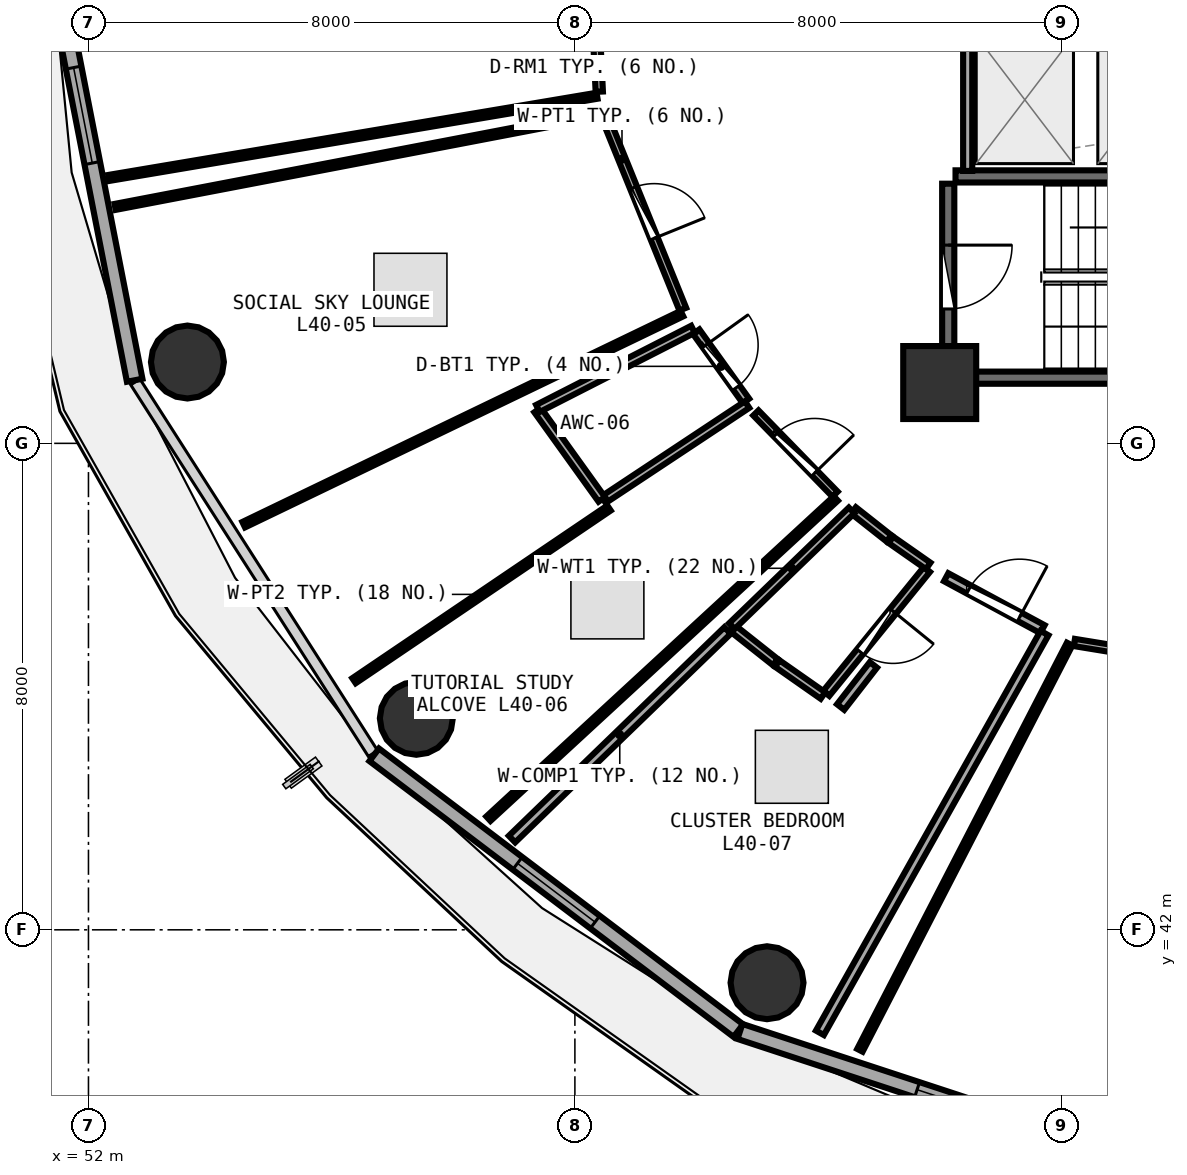
"""IFC4 building model, lengths in metres.
Left out: names, types, materials, properties, quantities, classifications, styles, units other than length and angle.
Written with IfcOpenShell. Run it as: python <this file> out.ifc"""

import sys

from ifc_helpers import new_model, si_unit, direction, frame, frame_2d, origin, origin_2d, place, context, subcontext, project, spatial, rectangle, circle, extrude, element, fill, save


model = new_model("IFC4")
c1 = context("Model", 3, precision=1e-05, world=origin(), true_north=direction((0.0, 1.0)))
c2 = subcontext(c1, "Body", "Model", "MODEL_VIEW")
j1 = project(units=[si_unit("LENGTHUNIT", "METRE"), si_unit("PLANEANGLEUNIT", "RADIAN")], contexts=[c1])
p1 = place(None, origin())
s1 = spatial("IfcSite", under=j1, at=p1, CompositionType="ELEMENT")
p2 = place(p1, origin())
s2 = spatial("IfcBuilding", under=s1, at=p2, CompositionType="ELEMENT")
p3 = place(p2, frame((0.0, 0.0, 158.1)))
s3 = spatial("IfcBuildingStorey", under=s2, at=p3, CompositionType="ELEMENT", Elevation=158.1)
p4 = place(p3, frame((66.0, 51.0, 0.0), z_axis=(0.0, 0.0, 1.0), x_axis=(1.0, 0.0, 0.0)))
e1 = element("IfcColumn", 1, at=p4, inside=s3, PredefinedType="PILASTER", context=c2, shape_type="SweptSolid", body=[
    extrude(rectangle(XDim=1.2, YDim=1.2, at=origin_2d()), origin(), (0.0, 0.0, 1.0), 3.75),
])
for number, where, z_axis, x_axis in (
    (2, (53.627, 51.337, 0.0), (0.0, 0.0, 1.0), (1.0, 0.0, 0.0)),
    (3, (57.392, 45.479, 0.0), (0.0, 0.0, 1.0), (1.0, 0.0, 0.0)),
    (4, (63.16, 41.13, 0.0), (0.0, 0.0, 1.0), (1.0, 0.0, 0.0)),
):
    element("IfcColumn", number, at=place(p3, frame(where, z_axis=z_axis, x_axis=x_axis)), inside=s3, PredefinedType="COLUMN", context=c2, shape_type="SweptSolid", body=[
        extrude(circle(Radius=0.6, at=origin_2d()), origin(), (0.0, 0.0, 1.0), 3.75),
    ])
p5 = place(p3, frame((51.403, 57.985, 0.0), z_axis=(0.0, 0.0, 1.0), x_axis=(0.191716984769, -0.981450252306, 0.0)))
e5 = element("IfcWall", 5, at=p5, inside=s3, PredefinedType="SOLIDWALL", context=c2, shape_type="SweptSolid", body=[
    extrude(rectangle(XDim=7.079, YDim=0.26, at=frame_2d((3.54, 0.0))), origin(), (0.0, 0.0, 1.0), 3.475),
])
p6 = place(p5, frame((1.84, 0.0, 0.85)))
e6 = element("IfcOpeningElement", 6, at=p6, cuts=e5, PredefinedType="OPENING", context=c2, shape_type="SweptSolid", body=[
    extrude(rectangle(XDim=1.6, YDim=1.45, at=frame_2d((0.8, 0.725))), frame((0.0, 0.14, 0.0), z_axis=(0.0, -1.0, 0.0), x_axis=(1.0, 0.0, 0.0)), (0.0, 0.0, 1.0), 0.28),
])
p7 = place(p3, frame((56.699, 44.878, 0.0), z_axis=(0.0, 0.0, 1.0), x_axis=(0.797163719609, -0.603763202042, 0.0)))
e7 = element("IfcWall", 7, at=p7, inside=s3, PredefinedType="SOLIDWALL", context=c2, shape_type="SweptSolid", body=[
    extrude(rectangle(XDim=7.512, YDim=0.26, at=frame_2d((3.756, 0.0))), origin(), (0.0, 0.0, 1.0), 3.475),
])
p8 = place(p7, frame((2.956, 0.0, 0.85)))
e8 = element("IfcOpeningElement", 8, at=p8, cuts=e7, PredefinedType="OPENING", context=c2, shape_type="SweptSolid", body=[
    extrude(rectangle(XDim=1.6, YDim=1.45, at=frame_2d((0.8, 0.725))), frame((0.0, 0.14, 0.0), z_axis=(0.0, -1.0, 0.0), x_axis=(1.0, 0.0, 0.0)), (0.0, 0.0, 1.0), 0.28),
])
p9 = place(p3, frame((62.714, 40.328, 0.0), z_axis=(0.0, 0.0, 1.0), x_axis=(0.950038302428, -0.312133343173, 0.0)))
e9 = element("IfcWall", 9, at=p9, inside=s3, PredefinedType="SOLIDWALL", context=c2, shape_type="SweptSolid", body=[
    extrude(rectangle(XDim=7.733, YDim=0.26, at=frame_2d((3.867, 0.0))), origin(), (0.0, 0.0, 1.0), 3.475),
])
p10 = place(p9, frame((3.067, 0.0, 0.85)))
e10 = element("IfcOpeningElement", 10, at=p10, cuts=e9, PredefinedType="OPENING", context=c2, shape_type="SweptSolid", body=[
    extrude(rectangle(XDim=1.6, YDim=1.45, at=frame_2d((0.8, 0.725))), frame((0.0, 0.14, 0.0), z_axis=(0.0, -1.0, 0.0), x_axis=(1.0, 0.0, 0.0)), (0.0, 0.0, 1.0), 0.28),
])
for number, where, z_axis, x_axis in (
    (11, (66.26, 51.08, 0.0), (0.0, 0.0, 1.0), (1.0, 0.0, 0.0)),
    (12, (73.42, 54.39, 0.0), (0.0, 0.0, 1.0), (-1.0, 0.0, 0.0)),
):
    element("IfcWall", number, at=place(p3, frame(where, z_axis=z_axis, x_axis=x_axis)), inside=s3, PredefinedType="SHEAR", context=c2, shape_type="SweptSolid", body=[
        extrude(rectangle(XDim=7.16, YDim=0.2, at=frame_2d((3.58, 0.0))), origin(), (0.0, 0.0, 1.0), 3.49),
    ])
p11 = place(p3, frame((66.14, 54.27, 0.0), z_axis=(0.0, 0.0, 1.0), x_axis=(0.0, -1.0, 0.0)))
e13 = element("IfcWall", 13, at=p11, inside=s3, PredefinedType="SHEAR", context=c2, shape_type="SweptSolid", body=[
    extrude(rectangle(XDim=3.07, YDim=0.2, at=frame_2d((1.535, 0.0))), origin(), (0.0, 0.0, 1.0), 3.49),
])
p12 = place(p11, frame((1.01, 0.0, 0.0)))
e14 = element("IfcOpeningElement", 14, at=p12, cuts=e13, PredefinedType="OPENING", context=c2, shape_type="SweptSolid", body=[
    extrude(rectangle(XDim=1.05, YDim=2.1, at=frame_2d((0.525, 1.05))), frame((0.0, 0.11, 0.0), z_axis=(0.0, -1.0, 0.0), x_axis=(1.0, 0.0, 0.0)), (0.0, 0.0, 1.0), 0.22),
])
p13 = place(p3, frame((66.46, 54.48, 0.0), z_axis=(0.0, 0.0, 1.0), x_axis=(0.0, 1.0, 0.0)))
e15 = element("IfcWall", 15, at=p13, inside=s3, PredefinedType="PARTITIONING", context=c2, shape_type="SweptSolid", body=[
    extrude(rectangle(XDim=2.29, YDim=0.15, at=frame_2d((1.145, 0.0))), origin(), (0.0, 0.0, 1.0), 3.48),
])
p14 = place(p3, frame((68.214, 46.725, 0.0), z_axis=(0.0, 0.0, 1.0), x_axis=(0.986922164317, -0.161197523493, 0.0)))
e16 = element("IfcWall", 16, at=p14, inside=s3, PredefinedType="PARTITIONING", context=c2, shape_type="SweptSolid", body=[
    extrude(rectangle(XDim=6.877, YDim=0.12, at=frame_2d((3.439, 0.0))), origin(), (0.0, 0.0, 1.0), 2.975),
])
p15 = place(p14, frame((2.989, 0.0, 0.0)))
e17 = element("IfcOpeningElement", 17, at=p15, cuts=e16, PredefinedType="OPENING", context=c2, shape_type="SweptSolid", body=[
    extrude(rectangle(XDim=0.9, YDim=2.08, at=frame_2d((0.45, 1.04))), frame((0.0, 0.07, 0.0), z_axis=(0.0, -1.0, 0.0), x_axis=(1.0, 0.0, 0.0)), (0.0, 0.0, 1.0), 0.14),
])
p16 = place(p3, frame((60.238, 59.144, 0.0), z_axis=(0.0, 0.0, 1.0), x_axis=(0.048537190422, -0.998821375996, 0.0)))
e18 = element("IfcWall", 18, at=p16, inside=s3, PredefinedType="PARTITIONING", context=c2, shape_type="SweptSolid", body=[
    extrude(rectangle(XDim=3.365, YDim=0.12, at=frame_2d((1.683, 0.0))), origin(), (0.0, 0.0, 1.0), 2.975),
])
p17 = place(p16, frame((1.233, 0.0, 0.0)))
e19 = element("IfcOpeningElement", 19, at=p17, cuts=e18, PredefinedType="OPENING", context=c2, shape_type="SweptSolid", body=[
    extrude(rectangle(XDim=0.9, YDim=2.08, at=frame_2d((0.45, 1.04))), frame((0.0, 0.07, 0.0), z_axis=(0.0, -1.0, 0.0), x_axis=(1.0, 0.0, 0.0)), (0.0, 0.0, 1.0), 0.14),
])
p18 = place(p3, frame((60.492, 55.369, 0.0), z_axis=(0.0, 0.0, 1.0), x_axis=(0.3756420079, -0.926764847143, 0.0)))
e20 = element("IfcWall", 20, at=p18, inside=s3, PredefinedType="PARTITIONING", context=c2, shape_type="SweptSolid", body=[
    extrude(rectangle(XDim=3.413, YDim=0.12, at=frame_2d((1.707, 0.0))), origin(), (0.0, 0.0, 1.0), 3.235),
])
p19 = place(p18, frame((1.256, 0.0, 0.0)))
e21 = element("IfcOpeningElement", 21, at=p19, cuts=e20, PredefinedType="OPENING", context=c2, shape_type="SweptSolid", body=[
    extrude(rectangle(XDim=0.9, YDim=2.08, at=frame_2d((0.45, 1.04))), frame((0.0, 0.07, 0.0), z_axis=(0.0, -1.0, 0.0), x_axis=(1.0, 0.0, 0.0)), (0.0, 0.0, 1.0), 0.14),
])
p20 = place(p3, frame((61.995, 51.836, 0.0), z_axis=(0.0, 0.0, 1.0), x_axis=(0.583589438572, -0.81204886995, 0.0)))
e22 = element("IfcWall", 22, at=p20, inside=s3, PredefinedType="PLUMBINGWALL", context=c2, shape_type="SweptSolid", body=[
    extrude(rectangle(XDim=1.403, YDim=0.13, at=frame_2d((0.702, 0.0))), origin(), (0.0, 0.0, 1.0), 2.975),
])
p21 = place(p20, frame((0.272, 0.0, 0.0)))
e23 = element("IfcOpeningElement", 23, at=p21, cuts=e22, PredefinedType="OPENING", context=c2, shape_type="SweptSolid", body=[
    extrude(rectangle(XDim=0.86, YDim=2.05, at=frame_2d((0.43, 1.025))), frame((0.0, 0.075, 0.0), z_axis=(0.0, -1.0, 0.0), x_axis=(1.0, 0.0, 0.0)), (0.0, 0.0, 1.0), 0.15),
])
p22 = place(p3, frame((62.977, 50.5, 0.0), z_axis=(0.0, 0.0, 1.0), x_axis=(0.69801962686, -0.71607862733, 0.0)))
e24 = element("IfcWall", 24, at=p22, inside=s3, PredefinedType="PARTITIONING", context=c2, shape_type="SweptSolid", body=[
    extrude(rectangle(XDim=1.866, YDim=0.12, at=frame_2d((0.933, 0.0))), origin(), (0.0, 0.0, 1.0), 2.975),
])
p23 = place(p22, frame((0.483, 0.0, 0.0)))
e25 = element("IfcOpeningElement", 25, at=p23, cuts=e24, PredefinedType="OPENING", context=c2, shape_type="SweptSolid", body=[
    extrude(rectangle(XDim=0.9, YDim=2.08, at=frame_2d((0.45, 1.04))), frame((0.0, 0.07, 0.0), z_axis=(0.0, -1.0, 0.0), x_axis=(1.0, 0.0, 0.0)), (0.0, 0.0, 1.0), 0.14),
])
p24 = place(p3, frame((65.789, 47.927, 0.0), z_axis=(0.0, 0.0, 1.0), x_axis=(-0.630358119741, -0.776304476914, 0.0)))
e26 = element("IfcWall", 26, at=p24, inside=s3, PredefinedType="PLUMBINGWALL", context=c2, shape_type="SweptSolid", body=[
    extrude(rectangle(XDim=2.626, YDim=0.13, at=frame_2d((1.313, 0.0))), origin(), (0.0, 0.0, 1.0), 2.975),
])
p25 = place(p24, frame((0.883, 0.0, 0.0)))
e27 = element("IfcOpeningElement", 27, at=p25, cuts=e26, PredefinedType="OPENING", context=c2, shape_type="SweptSolid", body=[
    extrude(rectangle(XDim=0.86, YDim=2.05, at=frame_2d((0.43, 1.025))), frame((0.0, 0.075, 0.0), z_axis=(0.0, -1.0, 0.0), x_axis=(1.0, 0.0, 0.0)), (0.0, 0.0, 1.0), 0.15),
])
p26 = place(p3, frame((66.106, 47.799, 0.0), z_axis=(0.0, 0.0, 1.0), x_axis=(0.880052757217, -0.474875925389, 0.0)))
e28 = element("IfcWall", 28, at=p26, inside=s3, PredefinedType="PARTITIONING", context=c2, shape_type="SweptSolid", body=[
    extrude(rectangle(XDim=1.801, YDim=0.15, at=frame_2d((0.9, 0.0))), origin(), (0.0, 0.0, 1.0), 3.235),
])
p27 = place(p26, frame((0.425, 0.0, 0.0)))
e29 = element("IfcOpeningElement", 29, at=p27, cuts=e28, PredefinedType="OPENING", context=c2, shape_type="SweptSolid", body=[
    extrude(rectangle(XDim=0.95, YDim=2.08, at=frame_2d((0.475, 1.04))), frame((0.0, 0.085, 0.0), z_axis=(0.0, -1.0, 0.0), x_axis=(1.0, 0.0, 0.0)), (0.0, 0.0, 1.0), 0.17),
])
p28 = place(p3, frame((64.688, 40.019, 0.0), z_axis=(0.0, 0.0, 1.0), x_axis=(0.458748787104, 0.888566007864, 0.0)))
e30 = element("IfcWall", 30, at=p28, inside=s3, PredefinedType="PARTITIONING", context=c2, shape_type="SweptSolid", body=[
    extrude(rectangle(XDim=7.519, YDim=0.1, at=frame_2d((3.759, 0.0))), origin(), (0.0, 0.0, 1.0), 3.025),
])
p29 = place(p3, frame((60.365, 55.716, 0.0), z_axis=(0.0, 0.0, 1.0), x_axis=(-0.986127701838, -0.165988420279, 0.0)))
e31 = element("IfcWall", 31, at=p29, inside=s3, PredefinedType="PARTITIONING", context=c2, shape_type="SweptSolid", body=[
    extrude(rectangle(XDim=8.144, YDim=0.1, at=frame_2d((4.072, 0.0))), origin(), (0.0, 0.0, 1.0), 3.025),
])
p30 = place(p3, frame((61.761, 52.134, 0.0), z_axis=(0.0, 0.0, 1.0), x_axis=(-0.900968975812, -0.433883515042, 0.0)))
e32 = element("IfcWall", 32, at=p30, inside=s3, PredefinedType="PARTITIONING", context=c2, shape_type="SweptSolid", body=[
    extrude(rectangle(XDim=8.0, YDim=0.1, at=frame_2d((4.0, 0.0))), origin(), (0.0, 0.0, 1.0), 2.975),
])
p31 = place(p3, frame((52.438, 53.888, 0.0), z_axis=(0.0, 0.0, 1.0), x_axis=(0.982187250003, 0.187904778897, 0.0)))
e33 = element("IfcWall", 33, at=p31, inside=s3, PredefinedType="PARTITIONING", context=c2, shape_type="SweptSolid", body=[
    extrude(rectangle(XDim=8.137, YDim=0.1, at=frame_2d((4.069, 0.0))), origin(), (0.0, 0.0, 1.0), 3.025),
])
p32 = place(p3, frame((62.832, 50.637, 0.0), z_axis=(0.0, 0.0, 1.0), x_axis=(-0.833743735775, -0.55215159427, 0.0)))
e34 = element("IfcWall", 34, at=p32, inside=s3, PredefinedType="PLUMBINGWALL", context=c2, shape_type="SweptSolid", body=[
    extrude(rectangle(XDim=2.833, YDim=0.13, at=frame_2d((1.416, 0.0))), origin(), (0.0, 0.0, 1.0), 3.235),
])
p33 = place(p3, frame((60.442, 49.078, 0.0), z_axis=(0.0, 0.0, 1.0), x_axis=(-0.583480474688, 0.812127167172, 0.0)))
e35 = element("IfcWall", 35, at=p33, inside=s3, PredefinedType="PLUMBINGWALL", context=c2, shape_type="SweptSolid", body=[
    extrude(rectangle(XDim=1.811, YDim=0.13, at=frame_2d((0.906, 0.0))), origin(), (0.0, 0.0, 1.0), 3.48),
])
p34 = place(p3, frame((59.392, 50.574, 0.0), z_axis=(0.0, 0.0, 1.0), x_axis=(0.890678731245, 0.45463325627, 0.0)))
e36 = element("IfcWall", 36, at=p34, inside=s3, PredefinedType="PLUMBINGWALL", context=c2, shape_type="SweptSolid", body=[
    extrude(rectangle(XDim=2.863, YDim=0.13, at=frame_2d((1.432, 0.0))), origin(), (0.0, 0.0, 1.0), 2.975),
])
p35 = place(p3, frame((64.292, 49.094, 0.0), z_axis=(0.0, 0.0, 1.0), x_axis=(-0.73529828134, -0.677743636973, 0.0)))
e37 = element("IfcWall", 37, at=p35, inside=s3, PredefinedType="PARTITIONING", context=c2, shape_type="SweptSolid", body=[
    extrude(rectangle(XDim=7.771, YDim=0.1, at=frame_2d((3.886, 0.0))), origin(), (0.0, 0.0, 1.0), 3.025),
])
p36 = place(p3, frame((56.367, 46.096, 0.0), z_axis=(0.0, 0.0, 1.0), x_axis=(0.828061619218, 0.560637097219, 0.0)))
e38 = element("IfcWall", 38, at=p36, inside=s3, PredefinedType="PARTITIONING", context=c2, shape_type="SweptSolid", body=[
    extrude(rectangle(XDim=5.065, YDim=0.1, at=frame_2d((2.532, 0.0))), origin(), (0.0, 0.0, 1.0), 3.025),
])
p37 = place(p3, frame((64.581, 48.899, 0.0), z_axis=(0.0, 0.0, 1.0), x_axis=(0.785042223167, -0.619442255456, 0.0)))
e39 = element("IfcWall", 39, at=p37, inside=s3, PredefinedType="PLUMBINGWALL", context=c2, shape_type="SweptSolid", body=[
    extrude(rectangle(XDim=0.745, YDim=0.13, at=frame_2d((0.372, 0.0))), origin(), (0.0, 0.0, 1.0), 2.975),
])
p38 = place(p3, frame((65.198, 48.414, 0.0), z_axis=(0.0, 0.0, 1.0), x_axis=(0.819339212877, -0.573309039038, 0.0)))
e40 = element("IfcWall", 40, at=p38, inside=s3, PredefinedType="PLUMBINGWALL", context=c2, shape_type="SweptSolid", body=[
    extrude(rectangle(XDim=0.748, YDim=0.13, at=frame_2d((0.374, 0.0))), origin(), (0.0, 0.0, 1.0), 2.975),
])
p39 = place(p3, frame((64.08, 45.853, 0.0), z_axis=(0.0, 0.0, 1.0), x_axis=(-0.819219412421, 0.57348021266, 0.0)))
e41 = element("IfcWall", 41, at=p39, inside=s3, PredefinedType="PLUMBINGWALL", context=c2, shape_type="SweptSolid", body=[
    extrude(rectangle(XDim=0.917, YDim=0.13, at=frame_2d((0.458, 0.0))), origin(), (0.0, 0.0, 1.0), 3.48),
])
p40 = place(p3, frame((63.296, 46.402, 0.0), z_axis=(0.0, 0.0, 1.0), x_axis=(-0.783920729318, 0.620860926573, 0.0)))
e42 = element("IfcWall", 42, at=p40, inside=s3, PredefinedType="PLUMBINGWALL", context=c2, shape_type="SweptSolid", body=[
    extrude(rectangle(XDim=0.91, YDim=0.13, at=frame_2d((0.455, 0.0))), origin(), (0.0, 0.0, 1.0), 3.48),
])
p41 = place(p3, frame((62.581, 46.994, 0.0), z_axis=(0.0, 0.0, 1.0), x_axis=(0.719038860306, 0.694969867958, 0.0)))
e43 = element("IfcWall", 43, at=p41, inside=s3, PredefinedType="PLUMBINGWALL", context=c2, shape_type="SweptSolid", body=[
    extrude(rectangle(XDim=2.739, YDim=0.13, at=frame_2d((1.369, 0.0))), origin(), (0.0, 0.0, 1.0), 3.235),
])
p42 = place(p3, frame((67.723, 46.88, 0.0), z_axis=(0.0, 0.0, 1.0), x_axis=(-0.489843086235, -0.8718106164, 0.0)))
e44 = element("IfcWall", 44, at=p42, inside=s3, PredefinedType="PARTITIONING", context=c2, shape_type="SweptSolid", body=[
    extrude(rectangle(XDim=7.541, YDim=0.15, at=frame_2d((3.771, 0.0))), origin(), (0.0, 0.0, 1.0), 3.025),
])
p43 = place(p3, frame((58.966, 43.492, 0.0), z_axis=(0.0, 0.0, 1.0), x_axis=(0.718569427948, 0.695455230204, 0.0)))
e45 = element("IfcWall", 45, at=p43, inside=s3, PredefinedType="PARTITIONING", context=c2, shape_type="SweptSolid", body=[
    extrude(rectangle(XDim=4.933, YDim=0.15, at=frame_2d((2.466, 0.0))), origin(), (0.0, 0.0, 1.0), 3.025),
])
p44 = place(p3, frame((64.371, 45.664, 0.0), z_axis=(0.0, 0.0, 1.0), x_axis=(0.613921364126, 0.789367188747, 0.0)))
e46 = element("IfcWall", 46, at=p44, inside=s3, PredefinedType="PARTITIONING", context=c2, shape_type="SweptSolid", body=[
    extrude(rectangle(XDim=0.878, YDim=0.15, at=frame_2d((0.439, 0.0))), origin(), (0.0, 0.0, 1.0), 2.975),
])
p45 = place(p6, origin())
e47 = element("IfcWindow", 47, at=p45, inside=s3, PartitioningType="SINGLE_PANEL", PredefinedType="WINDOW", context=c2, shape_type="SweptSolid", body=[
    extrude(rectangle(XDim=1.6, YDim=1.45, at=frame_2d((0.8, 0.725))), frame((0.0, 0.03, 0.0), z_axis=(0.0, -1.0, 0.0), x_axis=(1.0, 0.0, 0.0)), (0.0, 0.0, 1.0), 0.06),
])
fill(e6, e47)
p46 = place(p8, origin())
e48 = element("IfcWindow", 48, at=p46, inside=s3, PartitioningType="SINGLE_PANEL", PredefinedType="WINDOW", context=c2, shape_type="SweptSolid", body=[
    extrude(rectangle(XDim=1.6, YDim=1.45, at=frame_2d((0.8, 0.725))), frame((0.0, 0.03, 0.0), z_axis=(0.0, -1.0, 0.0), x_axis=(1.0, 0.0, 0.0)), (0.0, 0.0, 1.0), 0.06),
])
fill(e8, e48)
p47 = place(p10, origin())
e49 = element("IfcWindow", 49, at=p47, inside=s3, PartitioningType="SINGLE_PANEL", PredefinedType="WINDOW", context=c2, shape_type="SweptSolid", body=[
    extrude(rectangle(XDim=1.6, YDim=1.45, at=frame_2d((0.8, 0.725))), frame((0.0, 0.03, 0.0), z_axis=(0.0, -1.0, 0.0), x_axis=(1.0, 0.0, 0.0)), (0.0, 0.0, 1.0), 0.06),
])
fill(e10, e49)
p48 = place(p12, origin())
e50 = element("IfcDoor", 50, at=p48, inside=s3, OperationType="SINGLE_SWING_LEFT", PredefinedType="DOOR", context=c2, shape_type="SweptSolid", body=[
    extrude(rectangle(XDim=1.05, YDim=2.1, at=frame_2d((0.525, 1.05))), frame((0.0, 0.025, 0.0), z_axis=(0.0, -1.0, 0.0), x_axis=(1.0, 0.0, 0.0)), (0.0, 0.0, 1.0), 0.05),
])
fill(e14, e50)
p49 = place(p19, origin())
e51 = element("IfcDoor", 51, at=p49, inside=s3, OperationType="SINGLE_SWING_RIGHT", PredefinedType="DOOR", context=c2, shape_type="SweptSolid", body=[
    extrude(rectangle(XDim=0.9, YDim=2.08, at=frame_2d((0.45, 1.04))), frame((0.0, 0.025, 0.0), z_axis=(0.0, -1.0, 0.0), x_axis=(1.0, 0.0, 0.0)), (0.0, 0.0, 1.0), 0.05),
])
fill(e21, e51)
p50 = place(p21, origin())
e52 = element("IfcDoor", 52, at=p50, inside=s3, OperationType="SINGLE_SWING_LEFT", PredefinedType="DOOR", context=c2, shape_type="SweptSolid", body=[
    extrude(rectangle(XDim=0.86, YDim=2.05, at=frame_2d((0.43, 1.025))), frame((0.0, 0.025, 0.0), z_axis=(0.0, -1.0, 0.0), x_axis=(1.0, 0.0, 0.0)), (0.0, 0.0, 1.0), 0.05),
])
fill(e23, e52)
p51 = place(p23, origin())
e53 = element("IfcDoor", 53, at=p51, inside=s3, OperationType="SINGLE_SWING_RIGHT", PredefinedType="DOOR", context=c2, shape_type="SweptSolid", body=[
    extrude(rectangle(XDim=0.9, YDim=2.08, at=frame_2d((0.45, 1.04))), frame((0.0, 0.025, 0.0), z_axis=(0.0, -1.0, 0.0), x_axis=(1.0, 0.0, 0.0)), (0.0, 0.0, 1.0), 0.05),
])
fill(e25, e53)
p52 = place(p25, origin())
e54 = element("IfcDoor", 54, at=p52, inside=s3, OperationType="SINGLE_SWING_LEFT", PredefinedType="DOOR", context=c2, shape_type="SweptSolid", body=[
    extrude(rectangle(XDim=0.86, YDim=2.05, at=frame_2d((0.43, 1.025))), frame((0.0, 0.025, 0.0), z_axis=(0.0, -1.0, 0.0), x_axis=(1.0, 0.0, 0.0)), (0.0, 0.0, 1.0), 0.05),
])
fill(e27, e54)
p53 = place(p27, origin())
e55 = element("IfcDoor", 55, at=p53, inside=s3, OperationType="SINGLE_SWING_RIGHT", PredefinedType="DOOR", context=c2, shape_type="SweptSolid", body=[
    extrude(rectangle(XDim=0.95, YDim=2.08, at=frame_2d((0.475, 1.04))), frame((0.0, 0.025, 0.0), z_axis=(0.0, -1.0, 0.0), x_axis=(1.0, 0.0, 0.0)), (0.0, 0.0, 1.0), 0.05),
])
fill(e29, e55)
save(model, sys.argv[1])
